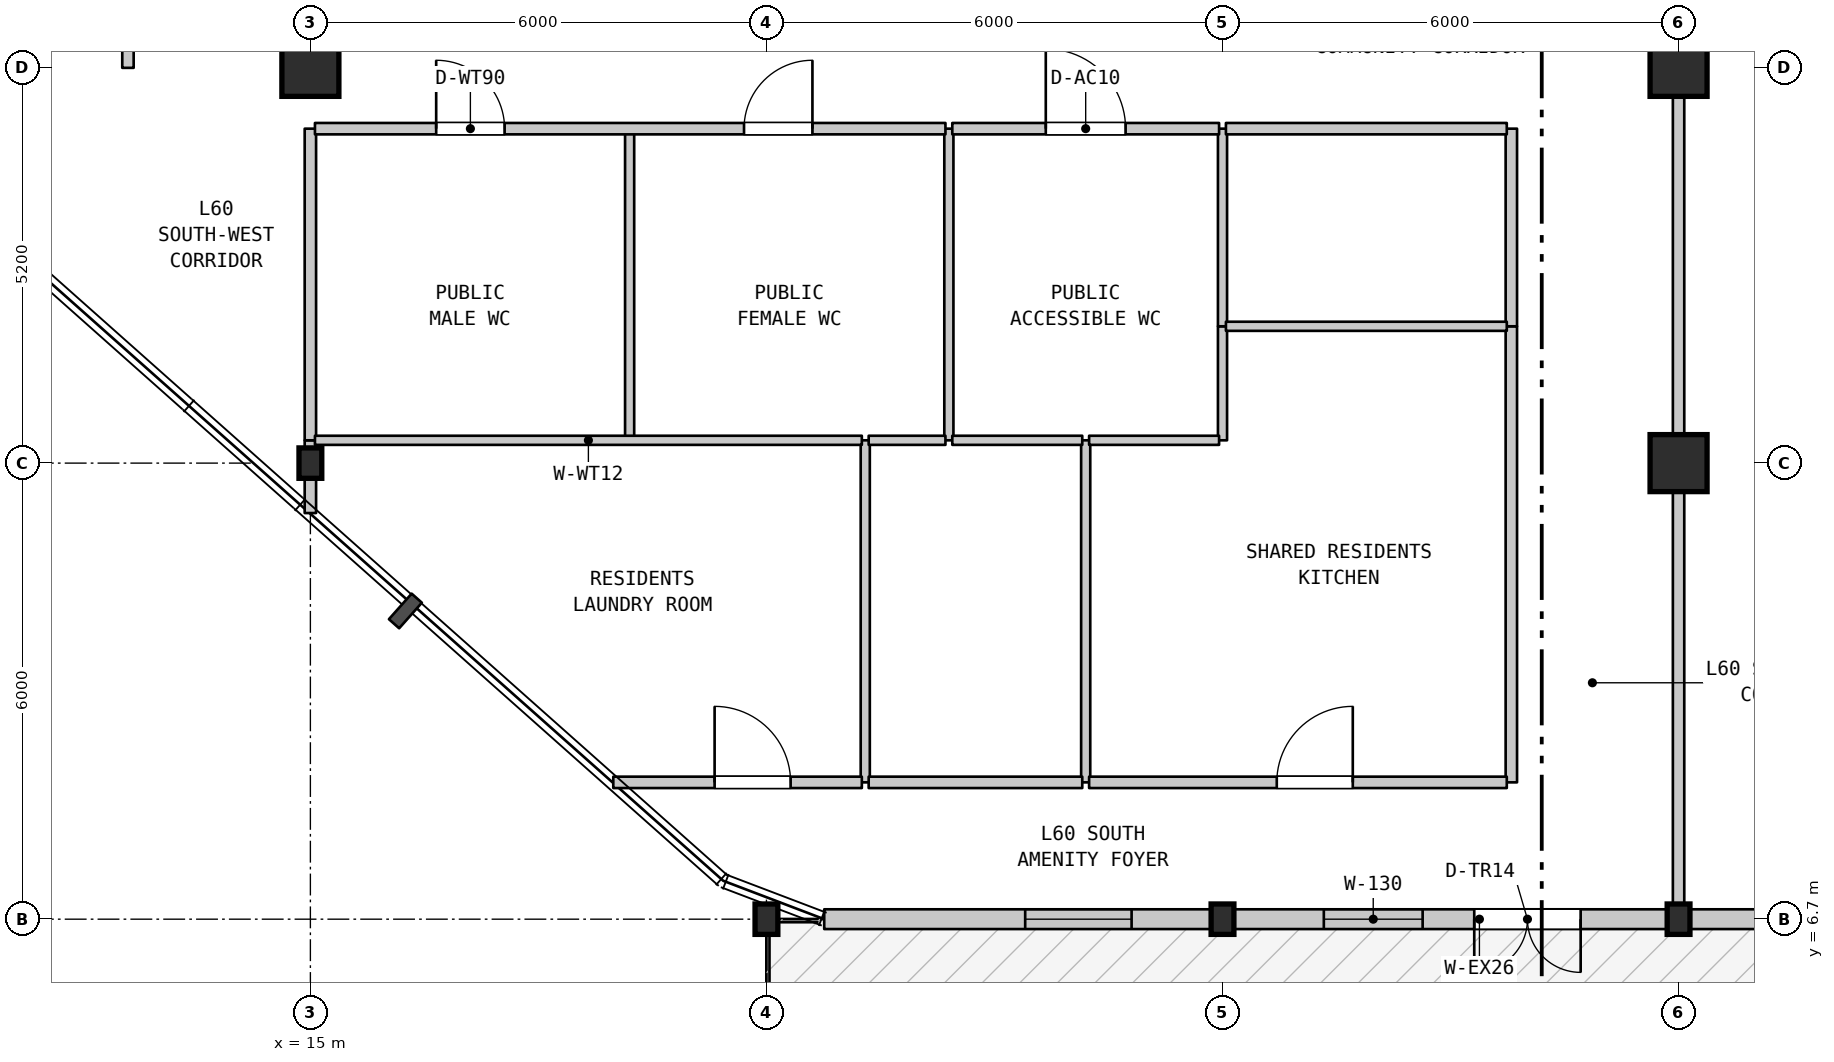
"""IFC4 building model, lengths in metres.
Left out: names, types, materials, properties, quantities, classifications, styles, units other than length and angle.
Written with IfcOpenShell. Run it as: python <this file> out.ifc"""

import sys

from ifc_helpers import new_model, si_unit, direction, frame, frame_2d, origin, origin_2d, place, context, subcontext, project, spatial, rectangle, i_section, extrude, element, fill, save


model = new_model("IFC4")
c1 = context("Model", 3, precision=1e-05, world=origin(), true_north=direction((0.0, 1.0)))
c2 = subcontext(c1, "Body", "Model", "MODEL_VIEW")
j1 = project(units=[si_unit("LENGTHUNIT", "METRE"), si_unit("PLANEANGLEUNIT", "RADIAN")], contexts=[c1])
p1 = place(None, origin())
s1 = spatial("IfcSite", under=j1, at=p1, CompositionType="ELEMENT")
p2 = place(p1, origin())
s2 = spatial("IfcBuilding", under=s1, at=p2, CompositionType="ELEMENT")
p3 = place(p2, frame((0.0, 0.0, 242.8)))
s3 = spatial("IfcBuildingStorey", under=s2, at=p3, CompositionType="ELEMENT", Elevation=242.8)
p4 = place(p3, frame((15.0, 12.7, 0.0), z_axis=(0.0, 0.0, 1.0), x_axis=(1.0, 0.0, 0.0)))
e1 = element("IfcColumn", 1, at=p4, inside=s3, PredefinedType="COLUMN", context=c2, shape_type="SweptSolid", body=[
    extrude(i_section(OverallWidth=0.3, OverallDepth=0.4, WebThickness=0.013, FlangeThickness=0.024, FilletRadius=0.027, at=origin_2d()), origin(), (0.0, 0.0, 1.0), 4.5),
])
p5 = place(p3, frame((15.0, 17.9, 0.0), z_axis=(0.0, 0.0, 1.0), x_axis=(1.0, 0.0, 0.0)))
e2 = element("IfcColumn", 2, at=p5, inside=s3, PredefinedType="COLUMN", context=c2, shape_type="SweptSolid", body=[
    extrude(rectangle(XDim=0.75, YDim=0.75, at=origin_2d()), origin(), (0.0, 0.0, 1.0), 4.5),
])
for number, where, z_axis, x_axis in (
    (3, (21.0, 6.7, 0.0), (0.0, 0.0, 1.0), (1.0, 0.0, 0.0)),
    (4, (27.0, 6.7, 0.0), (0.0, 0.0, 1.0), (1.0, 0.0, 0.0)),
    (5, (33.0, 6.7, 0.0), (0.0, 0.0, 1.0), (1.0, 0.0, 0.0)),
):
    element("IfcColumn", number, at=place(p3, frame(where, z_axis=z_axis, x_axis=x_axis)), inside=s3, PredefinedType="COLUMN", context=c2, shape_type="SweptSolid", body=[
        extrude(i_section(OverallWidth=0.3, OverallDepth=0.4, WebThickness=0.013, FlangeThickness=0.024, FilletRadius=0.027, at=origin_2d()), origin(), (0.0, 0.0, 1.0), 4.5),
    ])
for number, where, z_axis, x_axis in (
    (6, (33.0, 12.7, 0.0), (0.0, 0.0, 1.0), (1.0, 0.0, 0.0)),
    (7, (33.0, 17.9, 0.0), (0.0, 0.0, 1.0), (1.0, 0.0, 0.0)),
):
    element("IfcColumn", number, at=place(p3, frame(where, z_axis=z_axis, x_axis=x_axis)), inside=s3, PredefinedType="COLUMN", context=c2, shape_type="SweptSolid", body=[
        extrude(rectangle(XDim=0.75, YDim=0.75, at=origin_2d()), origin(), (0.0, 0.0, 1.0), 4.5),
    ])
p6 = place(p3, frame((12.6, 17.9, 0.0), z_axis=(0.0, 0.0, 1.0), x_axis=(0.0, 1.0, 0.0)))
e8 = element("IfcWall", 8, at=p6, inside=s3, PredefinedType="STANDARD", context=c2, shape_type="SweptSolid", body=[
    extrude(rectangle(XDim=20.0, YDim=0.15, at=frame_2d((10.0, 0.0))), origin(), (0.0, 0.0, 1.0), 4.19),
])
p7 = place(p6, frame((9.1, 0.0, 0.0)))
e9 = element("IfcOpeningElement", 9, at=p7, cuts=e8, PredefinedType="OPENING", context=c2, shape_type="SweptSolid", body=[
    extrude(rectangle(XDim=1.0, YDim=2.15, at=frame_2d((0.5, 1.075))), frame((0.0, 0.085, 0.0), z_axis=(0.0, -1.0, 0.0), x_axis=(1.0, 0.0, 0.0)), (0.0, 0.0, 1.0), 0.17),
])
p8 = place(p3, frame((15.0, 12.043, 0.0), z_axis=(0.0, 0.0, 1.0), x_axis=(0.0, 1.0, 0.0)))
e10 = element("IfcWall", 10, at=p8, inside=s3, PredefinedType="STANDARD", context=c2, shape_type="SweptSolid", body=[
    extrude(rectangle(XDim=0.957, YDim=0.15, at=frame_2d((0.479, 0.0))), origin(), (0.0, 0.0, 1.0), 4.19),
])
p9 = place(p3, frame((15.0, 13.0, 0.0), z_axis=(0.0, 0.0, 1.0), x_axis=(0.0, 1.0, 0.0)))
e11 = element("IfcWall", 11, at=p9, inside=s3, PredefinedType="STANDARD", context=c2, shape_type="SweptSolid", body=[
    extrude(rectangle(XDim=4.1, YDim=0.15, at=frame_2d((2.05, 0.0))), origin(), (0.0, 0.0, 1.0), 3.9),
])
p10 = place(p3, frame((19.2, 13.0, 0.0), z_axis=(0.0, 0.0, 1.0), x_axis=(0.0, 1.0, 0.0)))
e12 = element("IfcWall", 12, at=p10, inside=s3, PredefinedType="PARTITIONING", context=c2, shape_type="SweptSolid", body=[
    extrude(rectangle(XDim=4.1, YDim=0.12, at=frame_2d((2.05, 0.0))), origin(), (0.0, 0.0, 1.0), 4.19),
])
p11 = place(p3, frame((22.3, 8.5, 0.0), z_axis=(0.0, 0.0, 1.0), x_axis=(0.0, 1.0, 0.0)))
e13 = element("IfcWall", 13, at=p11, inside=s3, PredefinedType="PARTITIONING", context=c2, shape_type="SweptSolid", body=[
    extrude(rectangle(XDim=4.5, YDim=0.12, at=frame_2d((2.25, 0.0))), origin(), (0.0, 0.0, 1.0), 4.19),
])
p12 = place(p3, frame((23.4, 13.0, 0.0), z_axis=(0.0, 0.0, 1.0), x_axis=(0.0, 1.0, 0.0)))
e14 = element("IfcWall", 14, at=p12, inside=s3, PredefinedType="PARTITIONING", context=c2, shape_type="SweptSolid", body=[
    extrude(rectangle(XDim=4.1, YDim=0.12, at=frame_2d((2.05, 0.0))), origin(), (0.0, 0.0, 1.0), 4.19),
])
p13 = place(p3, frame((25.2, 8.5, 0.0), z_axis=(0.0, 0.0, 1.0), x_axis=(0.0, 1.0, 0.0)))
e15 = element("IfcWall", 15, at=p13, inside=s3, PredefinedType="PARTITIONING", context=c2, shape_type="SweptSolid", body=[
    extrude(rectangle(XDim=4.5, YDim=0.12, at=frame_2d((2.25, 0.0))), origin(), (0.0, 0.0, 1.0), 4.19),
])
p14 = place(p3, frame((27.0, 13.0, 0.0), z_axis=(0.0, 0.0, 1.0), x_axis=(0.0, 1.0, 0.0)))
e16 = element("IfcWall", 16, at=p14, inside=s3, PredefinedType="PARTITIONING", context=c2, shape_type="SweptSolid", body=[
    extrude(rectangle(XDim=1.5, YDim=0.12, at=frame_2d((0.75, 0.0))), origin(), (0.0, 0.0, 1.0), 4.19),
])
p15 = place(p3, frame((27.0, 14.5, 0.0), z_axis=(0.0, 0.0, 1.0), x_axis=(0.0, 1.0, 0.0)))
e17 = element("IfcWall", 17, at=p15, inside=s3, PredefinedType="PARTITIONING", context=c2, shape_type="SweptSolid", body=[
    extrude(rectangle(XDim=2.6, YDim=0.12, at=frame_2d((1.3, 0.0))), origin(), (0.0, 0.0, 1.0), 4.19),
])
p16 = place(p3, frame((30.8, 8.5, 0.0), z_axis=(0.0, 0.0, 1.0), x_axis=(0.0, 1.0, 0.0)))
e18 = element("IfcWall", 18, at=p16, inside=s3, PredefinedType="STANDARD", context=c2, shape_type="SweptSolid", body=[
    extrude(rectangle(XDim=6.0, YDim=0.15, at=frame_2d((3.0, 0.0))), origin(), (0.0, 0.0, 1.0), 4.19),
])
p17 = place(p3, frame((30.8, 14.5, 0.0), z_axis=(0.0, 0.0, 1.0), x_axis=(0.0, 1.0, 0.0)))
e19 = element("IfcWall", 19, at=p17, inside=s3, PredefinedType="STANDARD", context=c2, shape_type="SweptSolid", body=[
    extrude(rectangle(XDim=2.6, YDim=0.15, at=frame_2d((1.3, 0.0))), origin(), (0.0, 0.0, 1.0), 4.19),
])
p18 = place(p3, frame((33.0, 6.71, 0.0), z_axis=(0.0, 0.0, 1.0), x_axis=(0.0, 1.0, 0.0)))
e20 = element("IfcWall", 20, at=p18, inside=s3, PredefinedType="STANDARD", context=c2, shape_type="SweptSolid", body=[
    extrude(rectangle(XDim=19.19, YDim=0.15, at=frame_2d((9.595, 0.0))), origin(), (0.0, 0.0, 1.0), 3.9),
])
p19 = place(p3, frame((18.985, 8.5, 0.0), z_axis=(0.0, 0.0, 1.0), x_axis=(1.0, 0.0, 0.0)))
e21 = element("IfcWall", 21, at=p19, inside=s3, PredefinedType="STANDARD", context=c2, shape_type="SweptSolid", body=[
    extrude(rectangle(XDim=3.27, YDim=0.15, at=frame_2d((1.635, 0.0))), origin(), (0.0, 0.0, 1.0), 4.19),
])
p20 = place(p19, frame((1.333, 0.0, 0.0)))
e22 = element("IfcOpeningElement", 22, at=p20, cuts=e21, PredefinedType="OPENING", context=c2, shape_type="SweptSolid", body=[
    extrude(rectangle(XDim=1.0, YDim=2.15, at=frame_2d((0.5, 1.075))), frame((0.0, 0.085, 0.0), z_axis=(0.0, -1.0, 0.0), x_axis=(1.0, 0.0, 0.0)), (0.0, 0.0, 1.0), 0.17),
])
p21 = place(p3, frame((22.345, 8.5, 0.0), z_axis=(0.0, 0.0, 1.0), x_axis=(1.0, 0.0, 0.0)))
e23 = element("IfcWall", 23, at=p21, inside=s3, PredefinedType="STANDARD", context=c2, shape_type="SweptSolid", body=[
    extrude(rectangle(XDim=2.81, YDim=0.15, at=frame_2d((1.405, 0.0))), origin(), (0.0, 0.0, 1.0), 4.19),
])
p22 = place(p3, frame((25.245, 8.5, 0.0), z_axis=(0.0, 0.0, 1.0), x_axis=(1.0, 0.0, 0.0)))
e24 = element("IfcWall", 24, at=p22, inside=s3, PredefinedType="STANDARD", context=c2, shape_type="SweptSolid", body=[
    extrude(rectangle(XDim=5.495, YDim=0.15, at=frame_2d((2.748, 0.0))), origin(), (0.0, 0.0, 1.0), 4.19),
])
p23 = place(p22, frame((2.469, 0.0, 0.0)))
e25 = element("IfcOpeningElement", 25, at=p23, cuts=e24, PredefinedType="OPENING", context=c2, shape_type="SweptSolid", body=[
    extrude(rectangle(XDim=1.0, YDim=2.15, at=frame_2d((0.5, 1.075))), frame((0.0, 0.085, 0.0), z_axis=(0.0, -1.0, 0.0), x_axis=(1.0, 0.0, 0.0)), (0.0, 0.0, 1.0), 0.17),
])
p24 = place(p3, frame((15.06, 13.0, 0.0), z_axis=(0.0, 0.0, 1.0), x_axis=(1.0, 0.0, 0.0)))
e26 = element("IfcWall", 26, at=p24, inside=s3, PredefinedType="PARTITIONING", context=c2, shape_type="SweptSolid", body=[
    extrude(rectangle(XDim=7.195, YDim=0.12, at=frame_2d((3.597, 0.0))), origin(), (0.0, 0.0, 1.0), 4.19),
])
p25 = place(p3, frame((22.345, 13.0, 0.0), z_axis=(0.0, 0.0, 1.0), x_axis=(1.0, 0.0, 0.0)))
e27 = element("IfcWall", 27, at=p25, inside=s3, PredefinedType="PARTITIONING", context=c2, shape_type="SweptSolid", body=[
    extrude(rectangle(XDim=1.01, YDim=0.12, at=frame_2d((0.505, 0.0))), origin(), (0.0, 0.0, 1.0), 4.19),
])
for number, where, z_axis, x_axis in (
    (28, (23.445, 13.0, 0.0), (0.0, 0.0, 1.0), (1.0, 0.0, 0.0)),
    (29, (25.245, 13.0, 0.0), (0.0, 0.0, 1.0), (1.0, 0.0, 0.0)),
):
    element("IfcWall", number, at=place(p3, frame(where, z_axis=z_axis, x_axis=x_axis)), inside=s3, PredefinedType="PARTITIONING", context=c2, shape_type="SweptSolid", body=[
        extrude(rectangle(XDim=1.71, YDim=0.12, at=frame_2d((0.855, 0.0))), origin(), (0.0, 0.0, 1.0), 4.19),
    ])
p26 = place(p3, frame((27.045, 14.5, 0.0), z_axis=(0.0, 0.0, 1.0), x_axis=(1.0, 0.0, 0.0)))
e30 = element("IfcWall", 30, at=p26, inside=s3, PredefinedType="PARTITIONING", context=c2, shape_type="SweptSolid", body=[
    extrude(rectangle(XDim=3.695, YDim=0.12, at=frame_2d((1.848, 0.0))), origin(), (0.0, 0.0, 1.0), 4.19),
])
p27 = place(p3, frame((15.06, 17.1, 0.0), z_axis=(0.0, 0.0, 1.0), x_axis=(1.0, 0.0, 0.0)))
e31 = element("IfcWall", 31, at=p27, inside=s3, PredefinedType="STANDARD", context=c2, shape_type="SweptSolid", body=[
    extrude(rectangle(XDim=8.295, YDim=0.15, at=frame_2d((4.147, 0.0))), origin(), (0.0, 0.0, 1.0), 4.19),
])
p28 = place(p27, frame((1.595, 0.0, 0.0)))
e32 = element("IfcOpeningElement", 32, at=p28, cuts=e31, PredefinedType="OPENING", context=c2, shape_type="SweptSolid", body=[
    extrude(rectangle(XDim=0.9, YDim=2.1, at=frame_2d((0.45, 1.05))), frame((0.0, 0.085, 0.0), z_axis=(0.0, -1.0, 0.0), x_axis=(1.0, 0.0, 0.0)), (0.0, 0.0, 1.0), 0.17),
])
p29 = place(p27, frame((5.645, 0.0, 0.0)))
e33 = element("IfcOpeningElement", 33, at=p29, cuts=e31, PredefinedType="OPENING", context=c2, shape_type="SweptSolid", body=[
    extrude(rectangle(XDim=0.9, YDim=2.1, at=frame_2d((0.45, 1.05))), frame((0.0, 0.085, 0.0), z_axis=(0.0, -1.0, 0.0), x_axis=(1.0, 0.0, 0.0)), (0.0, 0.0, 1.0), 0.17),
])
p30 = place(p3, frame((23.445, 17.1, 0.0), z_axis=(0.0, 0.0, 1.0), x_axis=(1.0, 0.0, 0.0)))
e34 = element("IfcWall", 34, at=p30, inside=s3, PredefinedType="STANDARD", context=c2, shape_type="SweptSolid", body=[
    extrude(rectangle(XDim=3.51, YDim=0.15, at=frame_2d((1.755, 0.0))), origin(), (0.0, 0.0, 1.0), 4.19),
])
p31 = place(p30, frame((1.23, 0.0, 0.0)))
e35 = element("IfcOpeningElement", 35, at=p31, cuts=e34, PredefinedType="OPENING", context=c2, shape_type="SweptSolid", body=[
    extrude(rectangle(XDim=1.05, YDim=2.15, at=frame_2d((0.525, 1.075))), frame((0.0, 0.085, 0.0), z_axis=(0.0, -1.0, 0.0), x_axis=(1.0, 0.0, 0.0)), (0.0, 0.0, 1.0), 0.17),
])
p32 = place(p3, frame((27.045, 17.1, 0.0), z_axis=(0.0, 0.0, 1.0), x_axis=(1.0, 0.0, 0.0)))
e36 = element("IfcWall", 36, at=p32, inside=s3, PredefinedType="STANDARD", context=c2, shape_type="SweptSolid", body=[
    extrude(rectangle(XDim=3.695, YDim=0.15, at=frame_2d((1.848, 0.0))), origin(), (0.0, 0.0, 1.0), 4.19),
])
p33 = place(p3, frame((39.0, 6.7, 0.0), z_axis=(0.0, 0.0, 1.0), x_axis=(-1.0, 0.0, 0.0)))
e37 = element("IfcWall", 37, at=p33, inside=s3, PredefinedType="STANDARD", context=c2, shape_type="SweptSolid", body=[
    extrude(rectangle(XDim=17.24, YDim=0.26, at=frame_2d((8.62, 0.0))), origin(), (0.0, 0.0, 1.0), 3.84),
])
p34 = place(p33, frame((7.288, 0.0, 0.0)))
e38 = element("IfcOpeningElement", 38, at=p34, cuts=e37, PredefinedType="OPENING", context=c2, shape_type="SweptSolid", body=[
    extrude(rectangle(XDim=1.4, YDim=2.2, at=frame_2d((0.7, 1.1))), frame((0.0, 0.14, 0.0), z_axis=(0.0, -1.0, 0.0), x_axis=(1.0, 0.0, 0.0)), (0.0, 0.0, 1.0), 0.28),
])
p35 = place(p33, frame((2.23, 0.0, 0.9)))
e39 = element("IfcOpeningElement", 39, at=p35, cuts=e37, PredefinedType="OPENING", context=c2, shape_type="SweptSolid", body=[
    extrude(rectangle(XDim=1.4, YDim=1.85, at=frame_2d((0.7, 0.925))), frame((0.0, 0.14, 0.0), z_axis=(0.0, -1.0, 0.0), x_axis=(1.0, 0.0, 0.0)), (0.0, 0.0, 1.0), 0.28),
])
p36 = place(p33, frame((9.367, 0.0, 0.9)))
e40 = element("IfcOpeningElement", 40, at=p36, cuts=e37, PredefinedType="OPENING", context=c2, shape_type="SweptSolid", body=[
    extrude(rectangle(XDim=1.3, YDim=1.9, at=frame_2d((0.65, 0.95))), frame((0.0, 0.14, 0.0), z_axis=(0.0, -1.0, 0.0), x_axis=(1.0, 0.0, 0.0)), (0.0, 0.0, 1.0), 0.28),
])
p37 = place(p33, frame((13.196, 0.0, 0.9)))
e41 = element("IfcOpeningElement", 41, at=p37, cuts=e37, PredefinedType="OPENING", context=c2, shape_type="SweptSolid", body=[
    extrude(rectangle(XDim=1.4, YDim=1.85, at=frame_2d((0.7, 0.925))), frame((0.0, 0.14, 0.0), z_axis=(0.0, -1.0, 0.0), x_axis=(1.0, 0.0, 0.0)), (0.0, 0.0, 1.0), 0.28),
])
p38 = place(p34, origin())
e42 = element("IfcDoor", 42, at=p38, inside=s3, OperationType="DOUBLE_DOOR_SINGLE_SWING", PredefinedType="DOOR", context=c2, shape_type="SweptSolid", body=[
    extrude(rectangle(XDim=1.4, YDim=2.2, at=frame_2d((0.7, 1.1))), frame((0.0, 0.025, 0.0), z_axis=(0.0, -1.0, 0.0), x_axis=(1.0, 0.0, 0.0)), (0.0, 0.0, 1.0), 0.05),
])
fill(e38, e42)
p39 = place(p36, origin())
e43 = element("IfcWindow", 43, at=p39, inside=s3, PartitioningType="SINGLE_PANEL", PredefinedType="WINDOW", context=c2, shape_type="SweptSolid", body=[
    extrude(rectangle(XDim=1.3, YDim=1.9, at=frame_2d((0.65, 0.95))), frame((0.0, 0.03, 0.0), z_axis=(0.0, -1.0, 0.0), x_axis=(1.0, 0.0, 0.0)), (0.0, 0.0, 1.0), 0.06),
])
fill(e40, e43)
p40 = place(p37, origin())
e44 = element("IfcWindow", 44, at=p40, inside=s3, PartitioningType="SINGLE_PANEL", PredefinedType="WINDOW", context=c2, shape_type="SweptSolid", body=[
    extrude(rectangle(XDim=1.4, YDim=1.85, at=frame_2d((0.7, 0.925))), frame((0.0, 0.03, 0.0), z_axis=(0.0, -1.0, 0.0), x_axis=(1.0, 0.0, 0.0)), (0.0, 0.0, 1.0), 0.06),
])
fill(e41, e44)
p41 = place(p20, origin())
e45 = element("IfcDoor", 45, at=p41, inside=s3, OperationType="SINGLE_SWING_LEFT", PredefinedType="DOOR", context=c2, shape_type="SweptSolid", body=[
    extrude(rectangle(XDim=1.0, YDim=2.15, at=frame_2d((0.5, 1.075))), frame((0.0, 0.025, 0.0), z_axis=(0.0, -1.0, 0.0), x_axis=(1.0, 0.0, 0.0)), (0.0, 0.0, 1.0), 0.05),
])
fill(e22, e45)
p42 = place(p23, origin())
e46 = element("IfcDoor", 46, at=p42, inside=s3, OperationType="SINGLE_SWING_RIGHT", PredefinedType="DOOR", context=c2, shape_type="SweptSolid", body=[
    extrude(rectangle(XDim=1.0, YDim=2.15, at=frame_2d((0.5, 1.075))), frame((0.0, 0.025, 0.0), z_axis=(0.0, -1.0, 0.0), x_axis=(1.0, 0.0, 0.0)), (0.0, 0.0, 1.0), 0.05),
])
fill(e25, e46)
p43 = place(p28, origin())
e47 = element("IfcDoor", 47, at=p43, inside=s3, OperationType="SINGLE_SWING_LEFT", PredefinedType="DOOR", context=c2, shape_type="SweptSolid", body=[
    extrude(rectangle(XDim=0.9, YDim=2.1, at=frame_2d((0.45, 1.05))), frame((0.0, 0.025, 0.0), z_axis=(0.0, -1.0, 0.0), x_axis=(1.0, 0.0, 0.0)), (0.0, 0.0, 1.0), 0.05),
])
fill(e32, e47)
p44 = place(p29, origin())
e48 = element("IfcDoor", 48, at=p44, inside=s3, OperationType="SINGLE_SWING_RIGHT", PredefinedType="DOOR", context=c2, shape_type="SweptSolid", body=[
    extrude(rectangle(XDim=0.9, YDim=2.1, at=frame_2d((0.45, 1.05))), frame((0.0, 0.025, 0.0), z_axis=(0.0, -1.0, 0.0), x_axis=(1.0, 0.0, 0.0)), (0.0, 0.0, 1.0), 0.05),
])
fill(e33, e48)
p45 = place(p31, origin())
e49 = element("IfcDoor", 49, at=p45, inside=s3, OperationType="SINGLE_SWING_LEFT", PredefinedType="DOOR", context=c2, shape_type="SweptSolid", body=[
    extrude(rectangle(XDim=1.05, YDim=2.15, at=frame_2d((0.525, 1.075))), frame((0.0, 0.025, 0.0), z_axis=(0.0, -1.0, 0.0), x_axis=(1.0, 0.0, 0.0)), (0.0, 0.0, 1.0), 0.05),
])
fill(e35, e49)
save(model, sys.argv[1])
